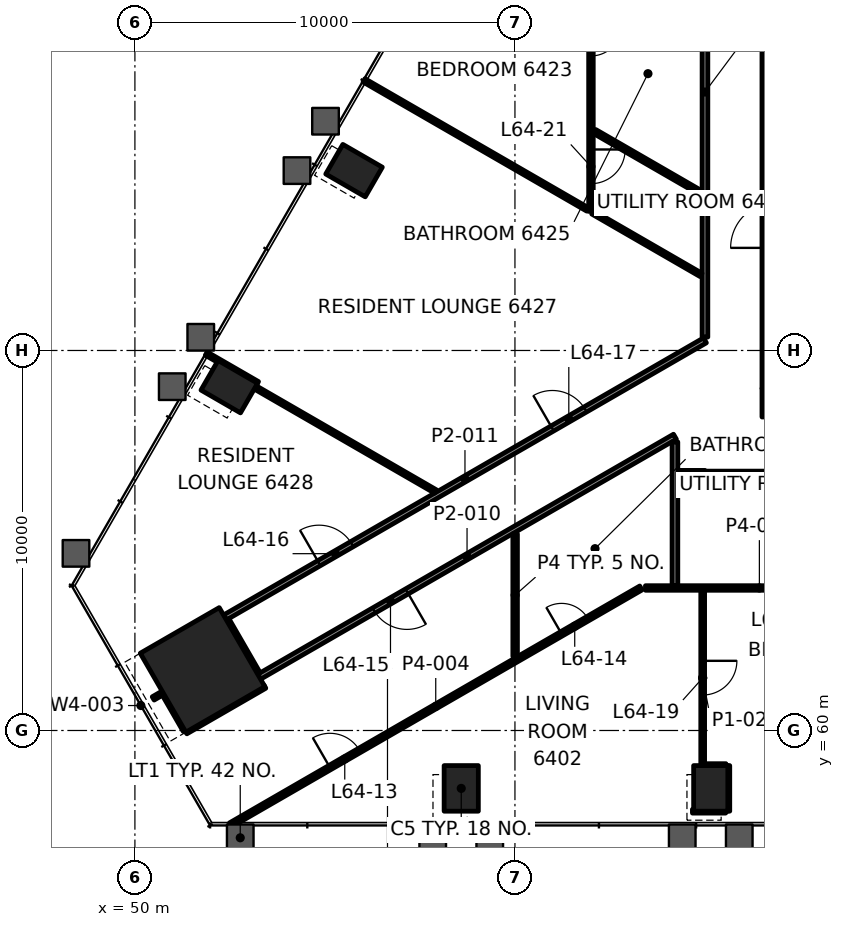
"""IFC4 building model, lengths in metres.
Left out: names, types, materials, properties, quantities, classifications, styles, units other than length and angle.
Written with IfcOpenShell. Run it as: python <this file> out.ifc"""

import sys

from ifc_helpers import new_model, si_unit, direction, frame, frame_2d, origin, origin_2d, place, context, subcontext, project, spatial, rectangle, hollow_rectangle, extrude, element, fill, save


model = new_model("IFC4")
c1 = context("Model", 3, precision=1e-05, world=origin(), true_north=direction((0.0, 1.0)))
c2 = subcontext(c1, "Body", "Model", "MODEL_VIEW")
j1 = project(units=[si_unit("LENGTHUNIT", "METRE"), si_unit("PLANEANGLEUNIT", "RADIAN")], contexts=[c1])
p1 = place(None, origin())
s1 = spatial("IfcSite", under=j1, at=p1, CompositionType="ELEMENT")
p2 = place(p1, origin())
s2 = spatial("IfcBuilding", under=s1, at=p2, CompositionType="ELEMENT")
p3 = place(p2, frame((0.0, 0.0, 270.6)))
s3 = spatial("IfcBuildingStorey", under=s2, at=p3, CompositionType="ELEMENT", Elevation=270.6)
p4 = place(p3, frame((51.78, 61.594, 0.0), z_axis=(0.0, 0.0, 1.0), x_axis=(0.5, -0.866025403784, 0.0)))
e1 = element("IfcColumn", 1, at=p4, inside=s3, PredefinedType="COLUMN", context=c2, shape_type="SweptSolid", body=[
    extrude(rectangle(XDim=2.4, YDim=2.4, at=origin_2d()), origin(), (0.0, 0.0, 1.0), 3.5),
])
for number, where, z_axis, x_axis in (
    (2, (58.587, 58.476, -0.0), (0.0, 0.0, 1.0), (1.0, 0.0, 0.0)),
    (3, (65.152, 58.476, -0.0), (0.0, 0.0, 1.0), (1.0, 0.0, 0.0)),
    (4, (55.766, 74.733, -0.0), (0.0, 0.0, 1.0), (-0.5, -0.866, 0.0)),
    (5, (52.483, 69.047, -0.0), (0.0, 0.0, 1.0), (-0.5, -0.866, 0.0)),
):
    element("IfcColumn", number, at=place(p3, frame(where, z_axis=z_axis, x_axis=x_axis)), inside=s3, PredefinedType="COLUMN", context=c2, shape_type="SweptSolid", body=[
        extrude(hollow_rectangle(XDim=0.9, YDim=1.2, WallThickness=0.06, at=origin_2d()), origin(), (0.0, 0.0, 1.0), 3.5),
    ])
p5 = place(p3, frame((66.5, 68.625, 0.0), z_axis=(0.0, 0.0, 1.0), x_axis=(1.0, 0.0, 0.0)))
e6 = element("IfcWall", 6, at=p5, inside=s3, PredefinedType="SHEAR", context=c2, shape_type="SweptSolid", body=[
    extrude(rectangle(XDim=17.0, YDim=0.75, at=frame_2d((8.5, 0.0))), origin(), (0.0, 0.0, 1.0), 3.3),
])
p6 = place(p5, frame((1.9, 0.0, 0.0)))
e7 = element("IfcOpeningElement", 7, at=p6, cuts=e6, PredefinedType="OPENING", context=c2, shape_type="SweptSolid", body=[
    extrude(rectangle(XDim=0.9, YDim=2.1, at=frame_2d((0.45, 1.05))), frame((0.0, 0.385, 0.0), z_axis=(0.0, -1.0, 0.0), x_axis=(1.0, 0.0, 0.0)), (0.0, 0.0, 1.0), 0.77),
])
p7 = place(p3, frame((66.875, 69.0, 0.0), z_axis=(0.0, 0.0, 1.0), x_axis=(0.0, 1.0, 0.0)))
e8 = element("IfcWall", 8, at=p7, inside=s3, PredefinedType="SHEAR", context=c2, shape_type="SweptSolid", body=[
    extrude(rectangle(XDim=12.0, YDim=0.75, at=frame_2d((6.0, 0.0))), origin(), (0.0, 0.0, 1.0), 3.3),
])
p8 = place(p7, frame((3.7, 0.0, 0.0)))
e9 = element("IfcOpeningElement", 9, at=p8, cuts=e8, PredefinedType="OPENING", context=c2, shape_type="SweptSolid", body=[
    extrude(rectangle(XDim=1.2, YDim=2.1, at=frame_2d((0.6, 1.05))), frame((0.0, 0.385, 0.0), z_axis=(0.0, -1.0, 0.0), x_axis=(1.0, 0.0, 0.0)), (0.0, 0.0, 1.0), 0.77),
])
p9 = place(p3, frame((64.67, 57.876, 0.0), z_axis=(0.0, 0.0, 1.0), x_axis=(1.0, 0.0, 0.0)))
e10 = element("IfcWall", 10, at=p9, inside=s3, PredefinedType="PARTITIONING", context=c2, shape_type="SweptSolid", body=[
    extrude(rectangle(XDim=0.875, YDim=0.1, at=frame_2d((0.438, 0.0))), origin(), (0.0, 0.0, 1.0), 2.7),
])
p10 = place(p3, frame((64.99, 59.076, 0.0), z_axis=(0.0, 0.0, 1.0), x_axis=(1.0, 0.0, 0.0)))
e11 = element("IfcWall", 11, at=p10, inside=s3, PredefinedType="PARTITIONING", context=c2, shape_type="SweptSolid", body=[
    extrude(rectangle(XDim=0.562, YDim=0.1, at=frame_2d((0.281, 0.0))), origin(), (0.0, 0.0, 1.0), 2.7),
])
p11 = place(p3, frame((63.434, 63.75, 0.0), z_axis=(0.0, 0.0, 1.0), x_axis=(1.0, 0.0, 0.0)))
e12 = element("IfcWall", 12, at=p11, inside=s3, PredefinedType="PARTITIONING", context=c2, shape_type="SweptSolid", body=[
    extrude(rectangle(XDim=5.995, YDim=0.12, at=frame_2d((2.997, 0.0))), origin(), (0.0, 0.0, 1.0), 2.7),
])
p12 = place(p11, frame((3.199, 0.0, 0.0)))
e13 = element("IfcOpeningElement", 13, at=p12, cuts=e12, PredefinedType="OPENING", context=c2, shape_type="SweptSolid", body=[
    extrude(rectangle(XDim=0.9, YDim=2.1, at=frame_2d((0.45, 1.05))), frame((0.0, 0.07, 0.0), z_axis=(0.0, -1.0, 0.0), x_axis=(1.0, 0.0, 0.0)), (0.0, 0.0, 1.0), 0.14),
])
p13 = place(p3, frame((85.0, 66.75, 0.0), z_axis=(0.0, 0.0, 1.0), x_axis=(-1.0, 0.0, 0.0)))
e14 = element("IfcWall", 14, at=p13, inside=s3, PredefinedType="PARTITIONING", context=c2, shape_type="SweptSolid", body=[
    extrude(rectangle(XDim=19.999, YDim=0.15, at=frame_2d((10.0, 0.0))), origin(), (0.0, 0.0, 1.0), 2.7),
])
p14 = place(p13, frame((2.96, 0.0, 0.0)))
e15 = element("IfcOpeningElement", 15, at=p14, cuts=e14, PredefinedType="OPENING", context=c2, shape_type="SweptSolid", body=[
    extrude(rectangle(XDim=1.0, YDim=2.1, at=frame_2d((0.5, 1.05))), frame((0.0, 0.085, 0.0), z_axis=(0.0, -1.0, 0.0), x_axis=(1.0, 0.0, 0.0)), (0.0, 0.0, 1.0), 0.17),
])
p15 = place(p13, frame((7.361, 0.0, 0.0)))
e16 = element("IfcOpeningElement", 16, at=p15, cuts=e14, PredefinedType="OPENING", context=c2, shape_type="SweptSolid", body=[
    extrude(rectangle(XDim=0.9, YDim=2.1, at=frame_2d((0.45, 1.05))), frame((0.0, 0.085, 0.0), z_axis=(0.0, -1.0, 0.0), x_axis=(1.0, 0.0, 0.0)), (0.0, 0.0, 1.0), 0.17),
])
p16 = place(p13, frame((9.55, 0.0, 0.0)))
e17 = element("IfcOpeningElement", 17, at=p16, cuts=e14, PredefinedType="OPENING", context=c2, shape_type="SweptSolid", body=[
    extrude(rectangle(XDim=0.9, YDim=2.1, at=frame_2d((0.45, 1.05))), frame((0.0, 0.085, 0.0), z_axis=(0.0, -1.0, 0.0), x_axis=(1.0, 0.0, 0.0)), (0.0, 0.0, 1.0), 0.17),
])
p17 = place(p13, frame((11.738, 0.0, 0.0)))
e18 = element("IfcOpeningElement", 18, at=p17, cuts=e14, PredefinedType="OPENING", context=c2, shape_type="SweptSolid", body=[
    extrude(rectangle(XDim=0.9, YDim=2.1, at=frame_2d((0.45, 1.05))), frame((0.0, 0.085, 0.0), z_axis=(0.0, -1.0, 0.0), x_axis=(1.0, 0.0, 0.0)), (0.0, 0.0, 1.0), 0.17),
])
p18 = place(p13, frame((13.926, 0.0, 0.0)))
e19 = element("IfcOpeningElement", 19, at=p18, cuts=e14, PredefinedType="OPENING", context=c2, shape_type="SweptSolid", body=[
    extrude(rectangle(XDim=0.9, YDim=2.1, at=frame_2d((0.45, 1.05))), frame((0.0, 0.085, 0.0), z_axis=(0.0, -1.0, 0.0), x_axis=(1.0, 0.0, 0.0)), (0.0, 0.0, 1.0), 0.17),
])
p19 = place(p3, frame((64.295, 66.769, 0.0), z_axis=(0.0, 0.0, 1.0), x_axis=(1.0, 0.0, 0.0)))
e20 = element("IfcWall", 20, at=p19, inside=s3, PredefinedType="PARTITIONING", context=c2, shape_type="SweptSolid", body=[
    extrude(rectangle(XDim=0.705, YDim=0.15, at=frame_2d((0.353, 0.0))), origin(), (0.0, 0.0, 1.0), 2.7),
])
p20 = place(p3, frame((52.517, 57.516, 0.0), z_axis=(0.0, 0.0, 1.0), x_axis=(0.866028080334, 0.499995364051, 0.0)))
e21 = element("IfcWall", 21, at=p20, inside=s3, PredefinedType="PARTITIONING", context=c2, shape_type="SweptSolid", body=[
    extrude(rectangle(XDim=12.467, YDim=0.12, at=frame_2d((6.234, 0.0))), origin(), (0.0, 0.0, 1.0), 2.7),
])
p21 = place(p20, frame((3.019, 0.0, 0.0)))
e22 = element("IfcOpeningElement", 22, at=p21, cuts=e21, PredefinedType="OPENING", context=c2, shape_type="SweptSolid", body=[
    extrude(rectangle(XDim=0.9, YDim=2.1, at=frame_2d((0.45, 1.05))), frame((0.0, 0.07, 0.0), z_axis=(0.0, -1.0, 0.0), x_axis=(1.0, 0.0, 0.0)), (0.0, 0.0, 1.0), 0.14),
])
p22 = place(p20, frame((10.057, 0.0, 0.0)))
e23 = element("IfcOpeningElement", 23, at=p22, cuts=e21, PredefinedType="OPENING", context=c2, shape_type="SweptSolid", body=[
    extrude(rectangle(XDim=0.8, YDim=2.1, at=frame_2d((0.4, 1.05))), frame((0.0, 0.07, 0.0), z_axis=(0.0, -1.0, 0.0), x_axis=(1.0, 0.0, 0.0)), (0.0, 0.0, 1.0), 0.14),
])
p23 = place(p3, frame((51.341, 59.955, 0.0), z_axis=(0.0, 0.0, 1.0), x_axis=(0.866036455013, 0.499980858223, 0.0)))
e24 = element("IfcWall", 24, at=p23, inside=s3, PredefinedType="PARTITIONING", context=c2, shape_type="SweptSolid", body=[
    extrude(rectangle(XDim=2.399, YDim=0.1, at=frame_2d((1.199, 0.0))), origin(), (0.0, 0.0, 1.0), 2.7),
])
p24 = place(p3, frame((64.21, 67.731, 0.0), z_axis=(0.0, 0.0, 1.0), x_axis=(-0.866027247007, -0.499996807431, 0.0)))
e25 = element("IfcWall", 25, at=p24, inside=s3, PredefinedType="PARTITIONING", context=c2, shape_type="SweptSolid", body=[
    extrude(rectangle(XDim=12.633, YDim=0.15, at=frame_2d((6.316, 0.0))), origin(), (0.0, 0.0, 1.0), 2.547),
])
p25 = place(p24, frame((8.143, 0.0, 0.0)))
e26 = element("IfcOpeningElement", 26, at=p25, cuts=e25, PredefinedType="OPENING", context=c2, shape_type="SweptSolid", body=[
    extrude(rectangle(XDim=1.0, YDim=2.1, at=frame_2d((0.5, 1.05))), frame((0.0, 0.085, 0.0), z_axis=(0.0, -1.0, 0.0), x_axis=(1.0, 0.0, 0.0)), (0.0, 0.0, 1.0), 0.17),
])
p26 = place(p3, frame((50.481, 60.844, 0.0), z_axis=(0.0, 0.0, 1.0), x_axis=(0.866429964967, 0.499298623879, 0.0)))
e27 = element("IfcWall", 27, at=p26, inside=s3, PredefinedType="PARTITIONING", context=c2, shape_type="SweptSolid", body=[
    extrude(rectangle(XDim=0.249, YDim=0.1, at=frame_2d((0.125, 0.0))), origin(), (0.0, 0.0, 1.0), 2.7),
])
p27 = place(p3, frame((52.37, 62.974, 0.0), z_axis=(0.0, 0.0, 1.0), x_axis=(0.866025849409, 0.499999228155, 0.0)))
e28 = element("IfcWall", 28, at=p27, inside=s3, PredefinedType="PARTITIONING", context=c2, shape_type="SweptSolid", body=[
    extrude(rectangle(XDim=14.584, YDim=0.15, at=frame_2d((7.292, 0.0))), origin(), (0.0, 0.0, 1.0), 2.7),
])
p28 = place(p27, frame((2.858, 0.0, 0.0)))
e29 = element("IfcOpeningElement", 29, at=p28, cuts=e28, PredefinedType="OPENING", context=c2, shape_type="SweptSolid", body=[
    extrude(rectangle(XDim=1.0, YDim=2.1, at=frame_2d((0.5, 1.05))), frame((0.0, 0.085, 0.0), z_axis=(0.0, -1.0, 0.0), x_axis=(1.0, 0.0, 0.0)), (0.0, 0.0, 1.0), 0.17),
])
p29 = place(p27, frame((9.947, 0.0, 0.0)))
e30 = element("IfcOpeningElement", 30, at=p29, cuts=e28, PredefinedType="OPENING", context=c2, shape_type="SweptSolid", body=[
    extrude(rectangle(XDim=1.0, YDim=2.1, at=frame_2d((0.5, 1.05))), frame((0.0, 0.085, 0.0), z_axis=(0.0, -1.0, 0.0), x_axis=(1.0, 0.0, 0.0)), (0.0, 0.0, 1.0), 0.17),
])
p30 = place(p3, frame((65.602, 57.876, 0.0), z_axis=(0.0, 0.0, 1.0), x_axis=(0.0, 1.0, 0.0)))
e31 = element("IfcWall", 31, at=p30, inside=s3, PredefinedType="PARTITIONING", context=c2, shape_type="SweptSolid", body=[
    extrude(rectangle(XDim=1.2, YDim=0.1, at=frame_2d((0.6, 0.0))), origin(), (0.0, 0.0, 1.0), 2.688),
])
p31 = place(p3, frame((65.0, 70.352, 0.0), z_axis=(0.0, 0.0, 1.0), x_axis=(0.0, 1.0, 0.0)))
e32 = element("IfcWall", 32, at=p31, inside=s3, PredefinedType="PARTITIONING", context=c2, shape_type="SweptSolid", body=[
    extrude(rectangle(XDim=12.898, YDim=0.15, at=frame_2d((6.449, 0.0))), origin(), (0.0, 0.0, 1.0), 2.7),
])
p32 = place(p3, frame((64.94, 63.69, 0.0), z_axis=(0.0, 0.0, 1.0), x_axis=(0.0, -1.0, 0.0)))
e33 = element("IfcWall", 33, at=p32, inside=s3, PredefinedType="PARTITIONING", context=c2, shape_type="SweptSolid", body=[
    extrude(rectangle(XDim=4.614, YDim=0.1, at=frame_2d((2.307, 0.0))), origin(), (0.0, 0.0, 1.0), 2.7),
])
p33 = place(p32, frame((1.857, 0.0, 0.0)))
e34 = element("IfcOpeningElement", 34, at=p33, cuts=e33, PredefinedType="OPENING", context=c2, shape_type="SweptSolid", body=[
    extrude(rectangle(XDim=0.9, YDim=2.1, at=frame_2d((0.45, 1.05))), frame((0.0, 0.06, 0.0), z_axis=(0.0, -1.0, 0.0), x_axis=(1.0, 0.0, 0.0)), (0.0, 0.0, 1.0), 0.12),
])
p34 = place(p3, frame((64.21, 63.81, 0.0), z_axis=(0.0, 0.0, 1.0), x_axis=(0.0, 1.0, 0.0)))
e35 = element("IfcWall", 35, at=p34, inside=s3, PredefinedType="PARTITIONING", context=c2, shape_type="SweptSolid", body=[
    extrude(rectangle(XDim=3.784, YDim=0.15, at=frame_2d((1.892, 0.0))), origin(), (0.0, 0.0, 1.0), 2.547),
])
p35 = place(p3, frame((62.0, 85.776, 0.0), z_axis=(0.0, 0.0, 1.0), x_axis=(0.0, -1.0, 0.0)))
e36 = element("IfcWall", 36, at=p35, inside=s3, PredefinedType="PARTITIONING", context=c2, shape_type="SweptSolid", body=[
    extrude(rectangle(XDim=12.115, YDim=0.12, at=frame_2d((6.058, 0.0))), origin(), (0.0, 0.0, 1.0), 2.688),
])
p36 = place(p35, frame((7.226, 0.0, 0.0)))
e37 = element("IfcOpeningElement", 37, at=p36, cuts=e36, PredefinedType="OPENING", context=c2, shape_type="SweptSolid", body=[
    extrude(rectangle(XDim=0.8, YDim=2.1, at=frame_2d((0.4, 1.05))), frame((0.0, 0.07, 0.0), z_axis=(0.0, -1.0, 0.0), x_axis=(1.0, 0.0, 0.0)), (0.0, 0.0, 1.0), 0.14),
])
p37 = place(p35, frame((10.487, 0.0, 0.0)))
e38 = element("IfcOpeningElement", 38, at=p37, cuts=e36, PredefinedType="OPENING", context=c2, shape_type="SweptSolid", body=[
    extrude(rectangle(XDim=0.9, YDim=2.1, at=frame_2d((0.45, 1.05))), frame((0.0, 0.07, 0.0), z_axis=(0.0, -1.0, 0.0), x_axis=(1.0, 0.0, 0.0)), (0.0, 0.0, 1.0), 0.14),
])
p38 = place(p3, frame((60.005, 61.948, 0.0), z_axis=(0.0, 0.0, 1.0), x_axis=(0.0, 1.0, 0.0)))
e39 = element("IfcWall", 39, at=p38, inside=s3, PredefinedType="PARTITIONING", context=c2, shape_type="SweptSolid", body=[
    extrude(rectangle(XDim=3.228, YDim=0.12, at=frame_2d((1.614, 0.0))), origin(), (0.0, 0.0, 1.0), 2.547),
])
p39 = place(p3, frame((53.229, 61.484, 0.0), z_axis=(0.0, 0.0, 1.0), x_axis=(-0.500052415518, 0.865995139556, 0.0)))
e40 = element("IfcWall", 40, at=p39, inside=s3, PredefinedType="PARTITIONING", context=c2, shape_type="SweptSolid", body=[
    extrude(rectangle(XDim=1.644, YDim=0.15, at=frame_2d((0.822, 0.0))), origin(), (0.0, 0.0, 1.0), 2.547),
])
p40 = place(p3, frame((51.316, 59.999, 0.0), z_axis=(0.0, 0.0, 1.0), x_axis=(-0.499955427682, 0.866051136095, 0.0)))
e41 = element("IfcWall", 41, at=p40, inside=s3, PredefinedType="PARTITIONING", context=c2, shape_type="SweptSolid", body=[
    extrude(rectangle(XDim=1.149, YDim=0.1, at=frame_2d((0.574, 0.0))), origin(), (0.0, 0.0, 1.0), 2.7),
])
p41 = place(p3, frame((64.891, 74.149, 0.0), z_axis=(0.0, 0.0, 1.0), x_axis=(-0.866019355129, 0.500010476433, 0.0)))
e42 = element("IfcWall", 42, at=p41, inside=s3, PredefinedType="PARTITIONING", context=c2, shape_type="SweptSolid", body=[
    extrude(rectangle(XDim=3.229, YDim=0.12, at=frame_2d((1.614, 0.0))), origin(), (0.0, 0.0, 1.0), 2.7),
])
p42 = place(p3, frame((64.899, 71.987, 0.0), z_axis=(0.0, 0.0, 1.0), x_axis=(-0.866032610133, 0.499987518031, 0.0)))
e43 = element("IfcWall", 43, at=p42, inside=s3, PredefinedType="PARTITIONING", context=c2, shape_type="SweptSolid", body=[
    extrude(rectangle(XDim=3.295, YDim=0.1, at=frame_2d((1.648, 0.0))), origin(), (0.0, 0.0, 1.0), 2.7),
])
p43 = place(p3, frame((53.228, 69.138, 0.0), z_axis=(0.0, 0.0, 1.0), x_axis=(-0.866018739521, 0.500011542666, 0.0)))
e44 = element("IfcWall", 44, at=p43, inside=s3, PredefinedType="PARTITIONING", context=c2, shape_type="SweptSolid", body=[
    extrude(rectangle(XDim=1.56, YDim=0.1, at=frame_2d((0.78, 0.0))), origin(), (0.0, 0.0, 1.0), 2.7),
])
p44 = place(p3, frame((57.91, 66.289, 0.0), z_axis=(0.0, 0.0, 1.0), x_axis=(-0.866026762963, 0.499997645826, 0.0)))
e45 = element("IfcWall", 45, at=p44, inside=s3, PredefinedType="PARTITIONING", context=c2, shape_type="SweptSolid", body=[
    extrude(rectangle(XDim=5.478, YDim=0.1, at=frame_2d((2.739, 0.0))), origin(), (0.0, 0.0, 1.0), 2.7),
])
p45 = place(p3, frame((61.915, 73.71, 0.0), z_axis=(0.0, 0.0, 1.0), x_axis=(-0.866024081565, 0.500002290144, 0.0)))
e46 = element("IfcWall", 46, at=p45, inside=s3, PredefinedType="PARTITIONING", context=c2, shape_type="SweptSolid", body=[
    extrude(rectangle(XDim=6.797, YDim=0.1, at=frame_2d((3.398, 0.0))), origin(), (0.0, 0.0, 1.0), 2.688),
])
p46 = place(p21, origin())
e47 = element("IfcDoor", 47, at=p46, inside=s3, OperationType="SINGLE_SWING_LEFT", PredefinedType="DOOR", context=c2, shape_type="SweptSolid", body=[
    extrude(rectangle(XDim=0.9, YDim=2.1, at=frame_2d((0.45, 1.05))), frame((0.0, 0.025, 0.0), z_axis=(0.0, -1.0, 0.0), x_axis=(1.0, 0.0, 0.0)), (0.0, 0.0, 1.0), 0.05),
])
fill(e22, e47)
p47 = place(p22, origin())
e48 = element("IfcDoor", 48, at=p47, inside=s3, OperationType="SINGLE_SWING_RIGHT", PredefinedType="DOOR", context=c2, shape_type="SweptSolid", body=[
    extrude(rectangle(XDim=0.8, YDim=2.1, at=frame_2d((0.4, 1.05))), frame((0.0, 0.025, 0.0), z_axis=(0.0, -1.0, 0.0), x_axis=(1.0, 0.0, 0.0)), (0.0, 0.0, 1.0), 0.05),
])
fill(e23, e48)
p48 = place(p25, origin())
e49 = element("IfcDoor", 49, at=p48, inside=s3, OperationType="SINGLE_SWING_LEFT", PredefinedType="DOOR", context=c2, shape_type="SweptSolid", body=[
    extrude(rectangle(XDim=1.0, YDim=2.1, at=frame_2d((0.5, 1.05))), frame((0.0, 0.025, 0.0), z_axis=(0.0, -1.0, 0.0), x_axis=(1.0, 0.0, 0.0)), (0.0, 0.0, 1.0), 0.05),
])
fill(e26, e49)
p49 = place(p28, origin())
e50 = element("IfcDoor", 50, at=p49, inside=s3, OperationType="SINGLE_SWING_LEFT", PredefinedType="DOOR", context=c2, shape_type="SweptSolid", body=[
    extrude(rectangle(XDim=1.0, YDim=2.1, at=frame_2d((0.5, 1.05))), frame((0.0, 0.025, 0.0), z_axis=(0.0, -1.0, 0.0), x_axis=(1.0, 0.0, 0.0)), (0.0, 0.0, 1.0), 0.05),
])
fill(e29, e50)
p50 = place(p29, origin())
e51 = element("IfcDoor", 51, at=p50, inside=s3, OperationType="SINGLE_SWING_RIGHT", PredefinedType="DOOR", context=c2, shape_type="SweptSolid", body=[
    extrude(rectangle(XDim=1.0, YDim=2.1, at=frame_2d((0.5, 1.05))), frame((0.0, 0.025, 0.0), z_axis=(0.0, -1.0, 0.0), x_axis=(1.0, 0.0, 0.0)), (0.0, 0.0, 1.0), 0.05),
])
fill(e30, e51)
p51 = place(p33, origin())
e52 = element("IfcDoor", 52, at=p51, inside=s3, OperationType="SINGLE_SWING_RIGHT", PredefinedType="DOOR", context=c2, shape_type="SweptSolid", body=[
    extrude(rectangle(XDim=0.9, YDim=2.1, at=frame_2d((0.45, 1.05))), frame((0.0, 0.025, 0.0), z_axis=(0.0, -1.0, 0.0), x_axis=(1.0, 0.0, 0.0)), (0.0, 0.0, 1.0), 0.05),
])
fill(e34, e52)
p52 = place(p36, origin())
e53 = element("IfcDoor", 53, at=p52, inside=s3, OperationType="SINGLE_SWING_RIGHT", PredefinedType="DOOR", context=c2, shape_type="SweptSolid", body=[
    extrude(rectangle(XDim=0.8, YDim=2.1, at=frame_2d((0.4, 1.05))), frame((0.0, 0.025, 0.0), z_axis=(0.0, -1.0, 0.0), x_axis=(1.0, 0.0, 0.0)), (0.0, 0.0, 1.0), 0.05),
])
fill(e37, e53)
p53 = place(p37, origin())
e54 = element("IfcDoor", 54, at=p53, inside=s3, OperationType="SINGLE_SWING_LEFT", PredefinedType="DOOR", context=c2, shape_type="SweptSolid", body=[
    extrude(rectangle(XDim=0.9, YDim=2.1, at=frame_2d((0.45, 1.05))), frame((0.0, 0.025, 0.0), z_axis=(0.0, -1.0, 0.0), x_axis=(1.0, 0.0, 0.0)), (0.0, 0.0, 1.0), 0.05),
])
fill(e38, e54)
save(model, sys.argv[1])
